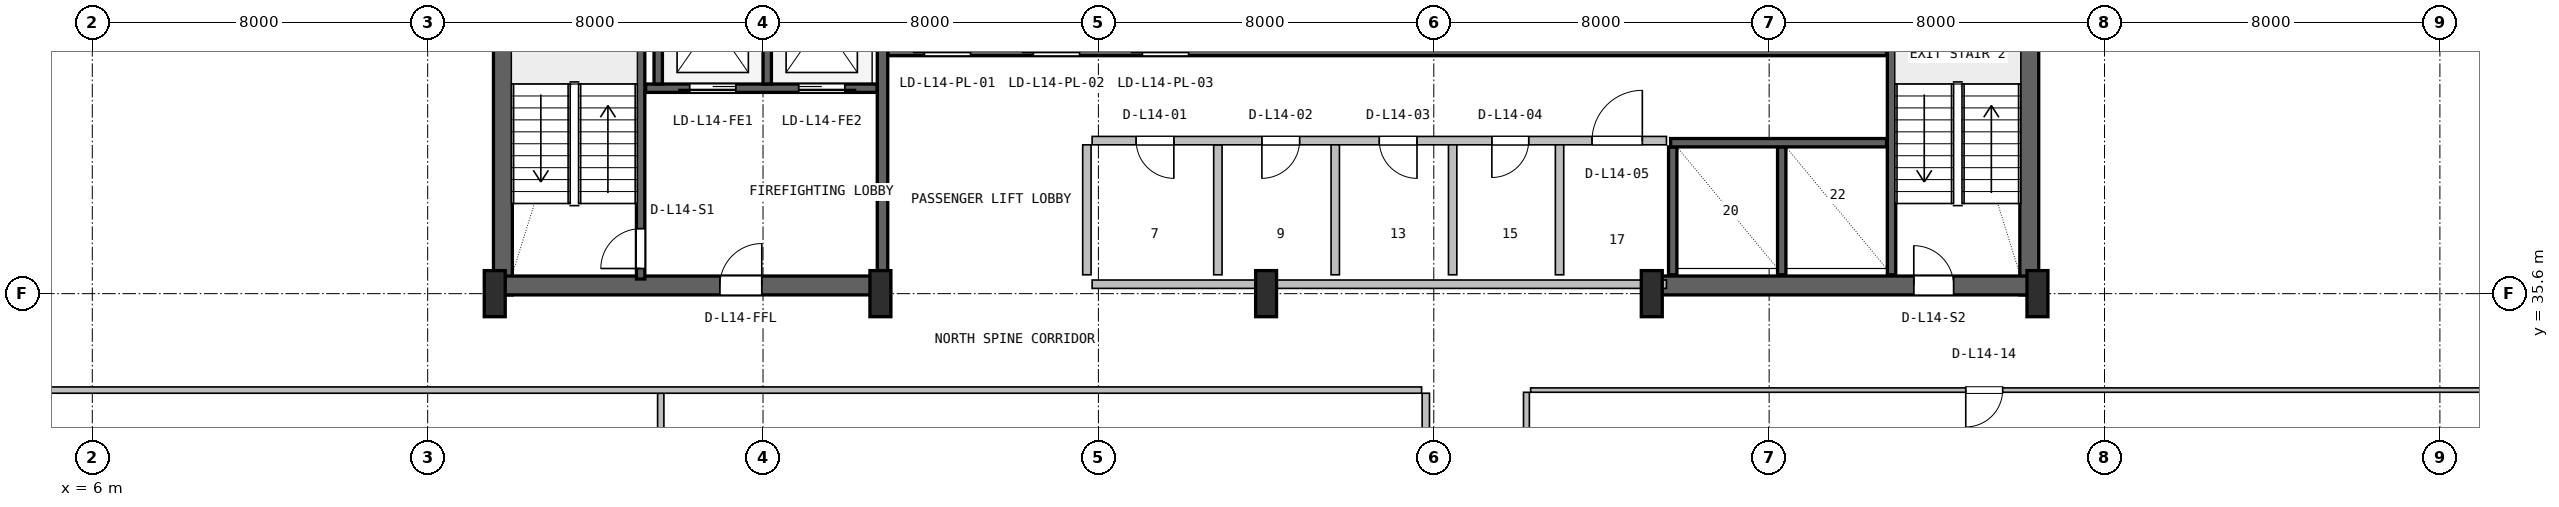
"""IFC4 building model, lengths in metres.
Left out: names, types, materials, properties, quantities, classifications, styles, units other than length and angle.
Written with IfcOpenShell. Run it as: python <this file> out.ifc"""

import sys

from ifc_helpers import new_model, si_unit, direction, frame, frame_2d, origin, origin_2d, place, context, subcontext, project, spatial, rectangle, i_section, extrude, source, transform, mapped, element, fill, save


model = new_model("IFC4")
c1 = context("Model", 3, precision=1e-05, world=origin(), true_north=direction((0.0, 1.0)))
c2 = subcontext(c1, "Body", "Model", "MODEL_VIEW")
j1 = project(units=[si_unit("LENGTHUNIT", "METRE"), si_unit("PLANEANGLEUNIT", "RADIAN")], contexts=[c1])
p1 = place(None, origin())
s1 = spatial("IfcSite", under=j1, at=p1, CompositionType="ELEMENT")
p2 = place(p1, origin())
s2 = spatial("IfcBuilding", under=s1, at=p2, CompositionType="ELEMENT")
p3 = place(p2, frame((0.0, 0.0, 62.7)))
s3 = spatial("IfcBuildingStorey", under=s2, at=p3, CompositionType="ELEMENT", Elevation=62.7)
for number, where, z_axis, x_axis in (
    (1, (15.795, 35.57, 0.0), (0.0, 0.0, 1.0), (0.0, 1.0, 0.0)),
    (2, (52.205, 35.57, 0.0), (0.0, 0.0, 1.0), (0.0, 1.0, 0.0)),
):
    element("IfcWall", number, at=place(p3, frame(where, z_axis=z_axis, x_axis=x_axis)), inside=s3, PredefinedType="SHEAR", context=c2, shape_type="SweptSolid", body=[
        extrude(rectangle(XDim=11.23, YDim=0.45, at=frame_2d((5.615, 0.0))), origin(), (0.0, 0.0, 1.0), 3.65),
    ])
p4 = place(p3, frame((15.57, 35.795, 0.0), z_axis=(0.0, 0.0, 1.0), x_axis=(1.0, 0.0, 0.0)))
e3 = element("IfcWall", 3, at=p4, inside=s3, PredefinedType="SHEAR", context=c2, shape_type="SweptSolid", body=[
    extrude(rectangle(XDim=9.23, YDim=0.45, at=frame_2d((4.615, 0.0))), origin(), (0.0, 0.0, 1.0), 3.65),
])
p5 = place(p4, frame((5.4, 0.0, 0.0)))
e4 = element("IfcOpeningElement", 4, at=p5, cuts=e3, PredefinedType="OPENING", context=c2, shape_type="SweptSolid", body=[
    extrude(rectangle(XDim=1.0, YDim=2.1, at=frame_2d((0.5, 1.05))), frame((0.0, 0.235, 0.0), z_axis=(0.0, -1.0, 0.0), x_axis=(1.0, 0.0, 0.0)), (0.0, 0.0, 1.0), 0.47),
])
p6 = place(p3, frame((43.2, 35.795, 0.0), z_axis=(0.0, 0.0, 1.0), x_axis=(1.0, 0.0, 0.0)))
e5 = element("IfcWall", 5, at=p6, inside=s3, PredefinedType="SHEAR", context=c2, shape_type="SweptSolid", body=[
    extrude(rectangle(XDim=9.23, YDim=0.45, at=frame_2d((4.615, 0.0))), origin(), (0.0, 0.0, 1.0), 3.65),
])
p7 = place(p6, frame((6.25, 0.0, 0.0)))
e6 = element("IfcOpeningElement", 6, at=p7, cuts=e5, PredefinedType="OPENING", context=c2, shape_type="SweptSolid", body=[
    extrude(rectangle(XDim=0.95, YDim=2.1, at=frame_2d((0.475, 1.05))), frame((0.0, 0.235, 0.0), z_axis=(0.0, -1.0, 0.0), x_axis=(1.0, 0.0, 0.0)), (0.0, 0.0, 1.0), 0.47),
])
m1 = source(origin(), c2, "Body", "SweptSolid", [
    extrude(i_section(OverallWidth=0.5, OverallDepth=1.1, WebThickness=0.018, FlangeThickness=0.032, FilletRadius=0.018, at=origin_2d()), origin(), (0.0, 0.0, 1.0), 3.9),
])
for number, where, z_axis, x_axis in (
    (7, (15.6, 35.6, 0.0), (0.0, 0.0, 1.0), (1.0, 0.0, 0.0)),
    (8, (24.8, 35.6, 0.0), (0.0, 0.0, 1.0), (1.0, 0.0, 0.0)),
    (9, (34.0, 35.6, 0.0), (0.0, 0.0, 1.0), (1.0, 0.0, 0.0)),
    (10, (43.2, 35.6, 0.0), (0.0, 0.0, 1.0), (1.0, 0.0, 0.0)),
    (11, (52.4, 35.6, 0.0), (0.0, 0.0, 1.0), (1.0, 0.0, 0.0)),
):
    element("IfcColumn", number, at=place(p3, frame(where, z_axis=z_axis, x_axis=x_axis)), inside=s3, PredefinedType="COLUMN", context=c2, shape_type="MappedRepresentation", body=[
        mapped(m1, transform((0.0, 0.0, 0.0), x_axis=(1.0, 0.0, 0.0), y_axis=(0.0, 1.0, 0.0), z_axis=(0.0, 0.0, 1.0), scale=1.0)),
    ])
p8 = place(p3, frame((19.08, 35.95, 0.0), z_axis=(0.0, 0.0, 1.0), x_axis=(0.0, 1.0, 0.0)))
e12 = element("IfcWall", 12, at=p8, inside=s3, PredefinedType="SHEAR", context=c2, shape_type="SweptSolid", body=[
    extrude(rectangle(XDim=9.65, YDim=0.2, at=frame_2d((4.825, 0.0))), origin(), (0.0, 0.0, 1.0), 3.65),
])
p9 = place(p8, frame((0.25, 0.0, 0.0)))
e13 = element("IfcOpeningElement", 13, at=p9, cuts=e12, PredefinedType="OPENING", context=c2, shape_type="SweptSolid", body=[
    extrude(rectangle(XDim=0.95, YDim=2.1, at=frame_2d((0.475, 1.05))), frame((0.0, 0.11, 0.0), z_axis=(0.0, -1.0, 0.0), x_axis=(1.0, 0.0, 0.0)), (0.0, 0.0, 1.0), 0.22),
])
p10 = place(p3, frame((24.85, 36.05, 0.0), z_axis=(0.0, 0.0, 1.0), x_axis=(0.0, 1.0, 0.0)))
e14 = element("IfcWall", 14, at=p10, inside=s3, PredefinedType="SHEAR", context=c2, shape_type="SweptSolid", body=[
    extrude(rectangle(XDim=10.45, YDim=0.25, at=frame_2d((5.225, 0.0))), origin(), (0.0, 0.0, 1.0), 3.65),
])
p11 = place(p3, frame((19.2, 40.5, 0.0), z_axis=(0.0, 0.0, 1.0), x_axis=(1.0, 0.0, 0.0)))
e15 = element("IfcWall", 15, at=p11, inside=s3, PredefinedType="SHEAR", context=c2, shape_type="SweptSolid", body=[
    extrude(rectangle(XDim=5.52, YDim=0.2, at=frame_2d((2.76, 0.0))), origin(), (0.0, 0.0, 1.0), 3.65),
])
p12 = place(p11, frame((1.05, 0.0, 0.0)))
e16 = element("IfcOpeningElement", 16, at=p12, cuts=e15, PredefinedType="OPENING", context=c2, shape_type="SweptSolid", body=[
    extrude(rectangle(XDim=1.1, YDim=2.18, at=frame_2d((0.55, 1.09))), frame((0.0, 0.11, 0.0), z_axis=(0.0, -1.0, 0.0), x_axis=(1.0, 0.0, 0.0)), (0.0, 0.0, 1.0), 0.22),
])
p13 = place(p11, frame((3.65, 0.0, 0.0)))
e17 = element("IfcOpeningElement", 17, at=p13, cuts=e15, PredefinedType="OPENING", context=c2, shape_type="SweptSolid", body=[
    extrude(rectangle(XDim=1.1, YDim=2.18, at=frame_2d((0.55, 1.09))), frame((0.0, 0.11, 0.0), z_axis=(0.0, -1.0, 0.0), x_axis=(1.0, 0.0, 0.0)), (0.0, 0.0, 1.0), 0.22),
])
p14 = place(p3, frame((22.1, 40.6, 0.0), z_axis=(0.0, 0.0, 1.0), x_axis=(0.0, 1.0, 0.0)))
e18 = element("IfcWall", 18, at=p14, inside=s3, PredefinedType="SHEAR", context=c2, shape_type="SweptSolid", body=[
    extrude(rectangle(XDim=3.0, YDim=0.2, at=frame_2d((1.5, 0.0))), origin(), (0.0, 0.0, 1.0), 3.65),
])
p15 = place(p3, frame((19.5, 40.6, 0.0), z_axis=(0.0, 0.0, 1.0), x_axis=(0.0, 1.0, 0.0)))
e19 = element("IfcWall", 19, at=p15, inside=s3, PredefinedType="SHEAR", context=c2, shape_type="SweptSolid", body=[
    extrude(rectangle(XDim=5.95, YDim=0.2, at=frame_2d((2.975, 0.0))), origin(), (0.0, 0.0, 1.0), 3.65),
])
p16 = place(p3, frame((48.92, 36.05, 0.0), z_axis=(0.0, 0.0, 1.0), x_axis=(0.0, 1.0, 0.0)))
e20 = element("IfcWall", 20, at=p16, inside=s3, PredefinedType="SHEAR", context=c2, shape_type="SweptSolid", body=[
    extrude(rectangle(XDim=10.5, YDim=0.2, at=frame_2d((5.25, 0.0))), origin(), (0.0, 0.0, 1.0), 3.65),
])
p17 = place(p3, frame((24.98, 41.4, 0.0), z_axis=(0.0, 0.0, 1.0), x_axis=(1.0, 0.0, 0.0)))
e21 = element("IfcWall", 21, at=p17, inside=s3, PredefinedType="SHEAR", context=c2, shape_type="SweptSolid", body=[
    extrude(rectangle(XDim=23.82, YDim=0.25, at=frame_2d((11.91, 0.0))), origin(), (0.0, 0.0, 1.0), 3.65),
])
p18 = place(p17, frame((0.87, 0.0, 0.0)))
e22 = element("IfcOpeningElement", 22, at=p18, cuts=e21, PredefinedType="OPENING", context=c2, shape_type="SweptSolid", body=[
    extrude(rectangle(XDim=1.1, YDim=2.18, at=frame_2d((0.55, 1.09))), frame((0.0, 0.135, 0.0), z_axis=(0.0, -1.0, 0.0), x_axis=(1.0, 0.0, 0.0)), (0.0, 0.0, 1.0), 0.27),
])
p19 = place(p17, frame((3.47, 0.0, 0.0)))
e23 = element("IfcOpeningElement", 23, at=p19, cuts=e21, PredefinedType="OPENING", context=c2, shape_type="SweptSolid", body=[
    extrude(rectangle(XDim=1.1, YDim=2.18, at=frame_2d((0.55, 1.09))), frame((0.0, 0.135, 0.0), z_axis=(0.0, -1.0, 0.0), x_axis=(1.0, 0.0, 0.0)), (0.0, 0.0, 1.0), 0.27),
])
p20 = place(p17, frame((6.07, 0.0, 0.0)))
e24 = element("IfcOpeningElement", 24, at=p20, cuts=e21, PredefinedType="OPENING", context=c2, shape_type="SweptSolid", body=[
    extrude(rectangle(XDim=1.1, YDim=2.18, at=frame_2d((0.55, 1.09))), frame((0.0, 0.135, 0.0), z_axis=(0.0, -1.0, 0.0), x_axis=(1.0, 0.0, 0.0)), (0.0, 0.0, 1.0), 0.27),
])
for number, where, z_axis, x_axis in (
    (25, (43.7, 36.05, 0.0), (0.0, 0.0, 1.0), (0.0, 1.0, 0.0)),
    (26, (46.3, 36.05, 0.0), (0.0, 0.0, 1.0), (0.0, 1.0, 0.0)),
):
    element("IfcWall", number, at=place(p3, frame(where, z_axis=z_axis, x_axis=x_axis)), inside=s3, PredefinedType="SHEAR", context=c2, shape_type="SweptSolid", body=[
        extrude(rectangle(XDim=3.05, YDim=0.2, at=frame_2d((1.525, 0.0))), origin(), (0.0, 0.0, 1.0), 3.65),
    ])
p21 = place(p3, frame((43.65, 39.2, 0.0), z_axis=(0.0, 0.0, 1.0), x_axis=(1.0, 0.0, 0.0)))
e27 = element("IfcWall", 27, at=p21, inside=s3, PredefinedType="SHEAR", context=c2, shape_type="SweptSolid", body=[
    extrude(rectangle(XDim=5.15, YDim=0.2, at=frame_2d((2.575, 0.0))), origin(), (0.0, 0.0, 1.0), 3.65),
])
p22 = place(p3, frame((29.85, 35.825, 0.0), z_axis=(0.0, 0.0, 1.0), x_axis=(1.0, 0.0, 0.0)))
e28 = element("IfcWall", 28, at=p22, inside=s3, PredefinedType="SOLIDWALL", context=c2, shape_type="SweptSolid", body=[
    extrude(rectangle(XDim=13.7, YDim=0.2, at=frame_2d((6.85, 0.0))), origin(), (0.0, 0.0, 1.0), 2.425),
])
p23 = place(p3, frame((32.85, 36.05, 0.0), z_axis=(0.0, 0.0, 1.0), x_axis=(0.0, 1.0, 0.0)))
e29 = element("IfcWall", 29, at=p23, inside=s3, PredefinedType="PLUMBINGWALL", context=c2, shape_type="SweptSolid", body=[
    extrude(rectangle(XDim=3.1, YDim=0.2, at=frame_2d((1.55, 0.0))), origin(), (0.0, 0.0, 1.0), 3.63),
])
p24 = place(p3, frame((29.85, 39.25, 0.0), z_axis=(0.0, 0.0, 1.0), x_axis=(1.0, 0.0, 0.0)))
e30 = element("IfcWall", 30, at=p24, inside=s3, PredefinedType="SOLIDWALL", context=c2, shape_type="SweptSolid", body=[
    extrude(rectangle(XDim=13.7, YDim=0.2, at=frame_2d((6.85, 0.0))), origin(), (0.0, 0.0, 1.0), 3.63),
])
p25 = place(p24, frame((1.05, 0.0, 0.0)))
e31 = element("IfcOpeningElement", 31, at=p25, cuts=e30, PredefinedType="OPENING", context=c2, shape_type="SweptSolid", body=[
    extrude(rectangle(XDim=0.9, YDim=2.06, at=frame_2d((0.45, 1.03))), frame((0.0, 0.11, 0.0), z_axis=(0.0, -1.0, 0.0), x_axis=(1.0, 0.0, 0.0)), (0.0, 0.0, 1.0), 0.22),
])
p26 = place(p24, frame((4.05, 0.0, 0.0)))
e32 = element("IfcOpeningElement", 32, at=p26, cuts=e30, PredefinedType="OPENING", context=c2, shape_type="SweptSolid", body=[
    extrude(rectangle(XDim=0.9, YDim=2.06, at=frame_2d((0.45, 1.03))), frame((0.0, 0.11, 0.0), z_axis=(0.0, -1.0, 0.0), x_axis=(1.0, 0.0, 0.0)), (0.0, 0.0, 1.0), 0.22),
])
p27 = place(p24, frame((6.85, 0.0, 0.0)))
e33 = element("IfcOpeningElement", 33, at=p27, cuts=e30, PredefinedType="OPENING", context=c2, shape_type="SweptSolid", body=[
    extrude(rectangle(XDim=0.9, YDim=2.06, at=frame_2d((0.45, 1.03))), frame((0.0, 0.11, 0.0), z_axis=(0.0, -1.0, 0.0), x_axis=(1.0, 0.0, 0.0)), (0.0, 0.0, 1.0), 0.22),
])
p28 = place(p24, frame((9.535, 0.0, 0.0)))
e34 = element("IfcOpeningElement", 34, at=p28, cuts=e30, PredefinedType="OPENING", context=c2, shape_type="SweptSolid", body=[
    extrude(rectangle(XDim=0.88, YDim=2.06, at=frame_2d((0.44, 1.03))), frame((0.0, 0.11, 0.0), z_axis=(0.0, -1.0, 0.0), x_axis=(1.0, 0.0, 0.0)), (0.0, 0.0, 1.0), 0.22),
])
p29 = place(p24, frame((11.925, 0.0, 0.0)))
e35 = element("IfcOpeningElement", 35, at=p29, cuts=e30, PredefinedType="OPENING", context=c2, shape_type="SweptSolid", body=[
    extrude(rectangle(XDim=1.2, YDim=2.1, at=frame_2d((0.6, 1.05))), frame((0.0, 0.11, 0.0), z_axis=(0.0, -1.0, 0.0), x_axis=(1.0, 0.0, 0.0)), (0.0, 0.0, 1.0), 0.22),
])
for number, where, z_axis, x_axis in (
    (36, (29.725, 36.05, 0.0), (0.0, 0.0, 1.0), (0.0, 1.0, 0.0)),
    (37, (35.65, 36.05, 0.0), (0.0, 0.0, 1.0), (0.0, 1.0, 0.0)),
    (38, (38.45, 36.05, 0.0), (0.0, 0.0, 1.0), (0.0, 1.0, 0.0)),
):
    element("IfcWall", number, at=place(p3, frame(where, z_axis=z_axis, x_axis=x_axis)), inside=s3, PredefinedType="PLUMBINGWALL", context=c2, shape_type="SweptSolid", body=[
        extrude(rectangle(XDim=3.1, YDim=0.2, at=frame_2d((1.55, 0.0))), origin(), (0.0, 0.0, 1.0), 3.63),
    ])
p30 = place(p3, frame((41.0, 36.05, 0.0), z_axis=(0.0, 0.0, 1.0), x_axis=(0.0, 1.0, 0.0)))
e39 = element("IfcWall", 39, at=p30, inside=s3, PredefinedType="SOLIDWALL", context=c2, shape_type="SweptSolid", body=[
    extrude(rectangle(XDim=3.1, YDim=0.2, at=frame_2d((1.55, 0.0))), origin(), (0.0, 0.0, 1.0), 3.63),
])
p31 = place(p3, frame((19.56, 18.095, 0.0), z_axis=(0.0, 0.0, 1.0), x_axis=(0.0, 1.0, 0.0)))
e40 = element("IfcWall", 40, at=p31, inside=s3, PredefinedType="PARTITIONING", context=c2, shape_type="SweptSolid", body=[
    extrude(rectangle(XDim=15.13, YDim=0.15, at=frame_2d((7.565, 0.0))), origin(), (0.0, 0.0, 1.0), 3.322),
])
p32 = place(p3, frame((2.18, 33.3, 0.0), z_axis=(0.0, 0.0, 1.0), x_axis=(1.0, 0.0, 0.0)))
e41 = element("IfcWall", 41, at=p32, inside=s3, PredefinedType="PARTITIONING", context=c2, shape_type="SweptSolid", body=[
    extrude(rectangle(XDim=35.53, YDim=0.15, at=frame_2d((17.765, 0.0))), origin(), (0.0, 0.0, 1.0), 2.852),
])
p33 = place(p3, frame((37.81, 18.095, 0.0), z_axis=(0.0, 0.0, 1.0), x_axis=(0.0, 1.0, 0.0)))
e42 = element("IfcWall", 42, at=p33, inside=s3, PredefinedType="PARTITIONING", context=c2, shape_type="SweptSolid", body=[
    extrude(rectangle(XDim=15.13, YDim=0.175, at=frame_2d((7.565, 0.0))), origin(), (0.0, 0.0, 1.0), 2.852),
])
p34 = place(p3, frame((40.21, 1.38, 0.0), z_axis=(0.0, 0.0, 1.0), x_axis=(0.0, 1.0, 0.0)))
e43 = element("IfcWall", 43, at=p34, inside=s3, PredefinedType="PARTITIONING", context=c2, shape_type="SweptSolid", body=[
    extrude(rectangle(XDim=31.867, YDim=0.14, at=frame_2d((15.934, 0.0))), origin(), (0.0, 0.0, 1.0), 2.852),
])
p35 = place(p34, frame((7.0, 0.0, 0.0)))
e44 = element("IfcOpeningElement", 44, at=p35, cuts=e43, PredefinedType="OPENING", context=c2, shape_type="SweptSolid", body=[
    extrude(rectangle(XDim=1.0, YDim=2.1, at=frame_2d((0.5, 1.05))), frame((0.0, 0.08, 0.0), z_axis=(0.0, -1.0, 0.0), x_axis=(1.0, 0.0, 0.0)), (0.0, 0.0, 1.0), 0.16),
])
p36 = place(p34, frame((17.275, 0.0, 0.0)))
e45 = element("IfcOpeningElement", 45, at=p36, cuts=e43, PredefinedType="OPENING", context=c2, shape_type="SweptSolid", body=[
    extrude(rectangle(XDim=0.88, YDim=2.06, at=frame_2d((0.44, 1.03))), frame((0.0, 0.08, 0.0), z_axis=(0.0, -1.0, 0.0), x_axis=(1.0, 0.0, 0.0)), (0.0, 0.0, 1.0), 0.16),
])
p37 = place(p3, frame((40.31, 33.3, 0.0), z_axis=(0.0, 0.0, 1.0), x_axis=(1.0, 0.0, 0.0)))
e46 = element("IfcWall", 46, at=p37, inside=s3, PredefinedType="PARTITIONING", context=c2, shape_type="SweptSolid", body=[
    extrude(rectangle(XDim=25.51, YDim=0.105, at=frame_2d((12.755, 0.0))), origin(), (0.0, 0.0, 1.0), 2.852),
])
p38 = place(p37, frame((10.38, 0.0, 0.0)))
e47 = element("IfcOpeningElement", 47, at=p38, cuts=e46, PredefinedType="OPENING", context=c2, shape_type="SweptSolid", body=[
    extrude(rectangle(XDim=0.88, YDim=2.06, at=frame_2d((0.44, 1.03))), frame((0.0, 0.062, 0.0), z_axis=(0.0, -1.0, 0.0), x_axis=(1.0, 0.0, 0.0)), (0.0, 0.0, 1.0), 0.125),
])
m2 = source(origin(), c2, "Body", "SweptSolid", [
    extrude(rectangle(XDim=0.95, YDim=2.1, at=frame_2d((0.475, 1.05))), frame((0.0, 0.025, 0.0), z_axis=(0.0, -1.0, 0.0), x_axis=(1.0, 0.0, 0.0)), (0.0, 0.0, 1.0), 0.05),
])
p39 = place(p9, origin())
e48 = element("IfcDoor", 48, at=p39, inside=s3, OperationType="SINGLE_SWING_LEFT", PredefinedType="DOOR", context=c2, shape_type="MappedRepresentation", body=[
    mapped(m2, transform((0.0, 0.0, 0.0), x_axis=(1.0, 0.0, 0.0), y_axis=(0.0, 1.0, 0.0), z_axis=(0.0, 0.0, 1.0), scale=1.0)),
])
fill(e13, e48)
m3 = source(origin(), c2, "Body", "SweptSolid", [
    extrude(rectangle(XDim=1.0, YDim=2.1, at=frame_2d((0.5, 1.05))), frame((0.0, 0.025, 0.0), z_axis=(0.0, -1.0, 0.0), x_axis=(1.0, 0.0, 0.0)), (0.0, 0.0, 1.0), 0.05),
])
p40 = place(p5, origin())
e49 = element("IfcDoor", 49, at=p40, inside=s3, OperationType="SINGLE_SWING_RIGHT", PredefinedType="DOOR", context=c2, shape_type="MappedRepresentation", body=[
    mapped(m3, transform((0.0, 0.0, 0.0), x_axis=(1.0, 0.0, 0.0), y_axis=(0.0, 1.0, 0.0), z_axis=(0.0, 0.0, 1.0), scale=1.0)),
])
fill(e4, e49)
m4 = source(origin(), c2, "Body", "SweptSolid", [
    extrude(rectangle(XDim=1.1, YDim=2.18, at=frame_2d((0.55, 1.09))), frame((0.0, 0.025, 0.0), z_axis=(0.0, -1.0, 0.0), x_axis=(1.0, 0.0, 0.0)), (0.0, 0.0, 1.0), 0.05),
])
p41 = place(p12, frame((1.1, 0.0, 0.0), z_axis=(0.0, 0.0, 1.0), x_axis=(-1.0, 0.0, 0.0)))
e50 = element("IfcDoor", 50, at=p41, inside=s3, OperationType="SLIDING_TO_LEFT", PredefinedType="DOOR", context=c2, shape_type="MappedRepresentation", body=[
    mapped(m4, transform((0.0, 0.0, 0.0), x_axis=(1.0, 0.0, 0.0), y_axis=(0.0, 1.0, 0.0), z_axis=(0.0, 0.0, 1.0), scale=1.0)),
])
fill(e16, e50)
p42 = place(p13, frame((1.1, 0.0, 0.0), z_axis=(0.0, 0.0, 1.0), x_axis=(-1.0, 0.0, 0.0)))
e51 = element("IfcDoor", 51, at=p42, inside=s3, OperationType="SLIDING_TO_RIGHT", PredefinedType="DOOR", context=c2, shape_type="MappedRepresentation", body=[
    mapped(m4, transform((0.0, 0.0, 0.0), x_axis=(1.0, 0.0, 0.0), y_axis=(0.0, 1.0, 0.0), z_axis=(0.0, 0.0, 1.0), scale=1.0)),
])
fill(e17, e51)
p43 = place(p7, origin())
e52 = element("IfcDoor", 52, at=p43, inside=s3, OperationType="SINGLE_SWING_LEFT", PredefinedType="DOOR", context=c2, shape_type="MappedRepresentation", body=[
    mapped(m2, transform((0.0, 0.0, 0.0), x_axis=(1.0, 0.0, 0.0), y_axis=(0.0, 1.0, 0.0), z_axis=(0.0, 0.0, 1.0), scale=1.0)),
])
fill(e6, e52)
m5 = source(origin(), c2, "Body", "SweptSolid", [
    extrude(rectangle(XDim=0.9, YDim=2.06, at=frame_2d((0.45, 1.03))), frame((0.0, 0.025, 0.0), z_axis=(0.0, -1.0, 0.0), x_axis=(1.0, 0.0, 0.0)), (0.0, 0.0, 1.0), 0.05),
])
p44 = place(p25, frame((0.9, 0.0, 0.0), z_axis=(0.0, 0.0, 1.0), x_axis=(-1.0, 0.0, 0.0)))
e53 = element("IfcDoor", 53, at=p44, inside=s3, OperationType="SINGLE_SWING_RIGHT", PredefinedType="DOOR", context=c2, shape_type="MappedRepresentation", body=[
    mapped(m5, transform((0.0, 0.0, 0.0), x_axis=(1.0, 0.0, 0.0), y_axis=(0.0, 1.0, 0.0), z_axis=(0.0, 0.0, 1.0), scale=1.0)),
])
fill(e31, e53)
p45 = place(p26, frame((0.9, 0.0, 0.0), z_axis=(0.0, 0.0, 1.0), x_axis=(-1.0, 0.0, 0.0)))
e54 = element("IfcDoor", 54, at=p45, inside=s3, OperationType="SINGLE_SWING_LEFT", PredefinedType="DOOR", context=c2, shape_type="MappedRepresentation", body=[
    mapped(m5, transform((0.0, 0.0, 0.0), x_axis=(1.0, 0.0, 0.0), y_axis=(0.0, 1.0, 0.0), z_axis=(0.0, 0.0, 1.0), scale=1.0)),
])
fill(e32, e54)
p46 = place(p27, frame((0.9, 0.0, 0.0), z_axis=(0.0, 0.0, 1.0), x_axis=(-1.0, 0.0, 0.0)))
e55 = element("IfcDoor", 55, at=p46, inside=s3, OperationType="SINGLE_SWING_RIGHT", PredefinedType="DOOR", context=c2, shape_type="MappedRepresentation", body=[
    mapped(m5, transform((0.0, 0.0, 0.0), x_axis=(1.0, 0.0, 0.0), y_axis=(0.0, 1.0, 0.0), z_axis=(0.0, 0.0, 1.0), scale=1.0)),
])
fill(e33, e55)
m6 = source(origin(), c2, "Body", "SweptSolid", [
    extrude(rectangle(XDim=0.88, YDim=2.06, at=frame_2d((0.44, 1.03))), frame((0.0, 0.025, 0.0), z_axis=(0.0, -1.0, 0.0), x_axis=(1.0, 0.0, 0.0)), (0.0, 0.0, 1.0), 0.05),
])
p47 = place(p28, frame((0.88, 0.0, 0.0), z_axis=(0.0, 0.0, 1.0), x_axis=(-1.0, 0.0, 0.0)))
e56 = element("IfcDoor", 56, at=p47, inside=s3, OperationType="SINGLE_SWING_LEFT", PredefinedType="DOOR", context=c2, shape_type="MappedRepresentation", body=[
    mapped(m6, transform((0.0, 0.0, 0.0), x_axis=(1.0, 0.0, 0.0), y_axis=(0.0, 1.0, 0.0), z_axis=(0.0, 0.0, 1.0), scale=1.0)),
])
fill(e34, e56)
m7 = source(origin(), c2, "Body", "SweptSolid", [
    extrude(rectangle(XDim=1.2, YDim=2.1, at=frame_2d((0.6, 1.05))), frame((0.0, 0.025, 0.0), z_axis=(0.0, -1.0, 0.0), x_axis=(1.0, 0.0, 0.0)), (0.0, 0.0, 1.0), 0.05),
])
p48 = place(p29, origin())
e57 = element("IfcDoor", 57, at=p48, inside=s3, OperationType="SINGLE_SWING_RIGHT", PredefinedType="DOOR", context=c2, shape_type="MappedRepresentation", body=[
    mapped(m7, transform((0.0, 0.0, 0.0), x_axis=(1.0, 0.0, 0.0), y_axis=(0.0, 1.0, 0.0), z_axis=(0.0, 0.0, 1.0), scale=1.0)),
])
fill(e35, e57)
p49 = place(p38, frame((0.88, 0.0, 0.0), z_axis=(0.0, 0.0, 1.0), x_axis=(-1.0, 0.0, 0.0)))
e58 = element("IfcDoor", 58, at=p49, inside=s3, OperationType="SINGLE_SWING_LEFT", PredefinedType="DOOR", context=c2, shape_type="MappedRepresentation", body=[
    mapped(m6, transform((0.0, 0.0, 0.0), x_axis=(1.0, 0.0, 0.0), y_axis=(0.0, 1.0, 0.0), z_axis=(0.0, 0.0, 1.0), scale=1.0)),
])
fill(e47, e58)
save(model, sys.argv[1])
